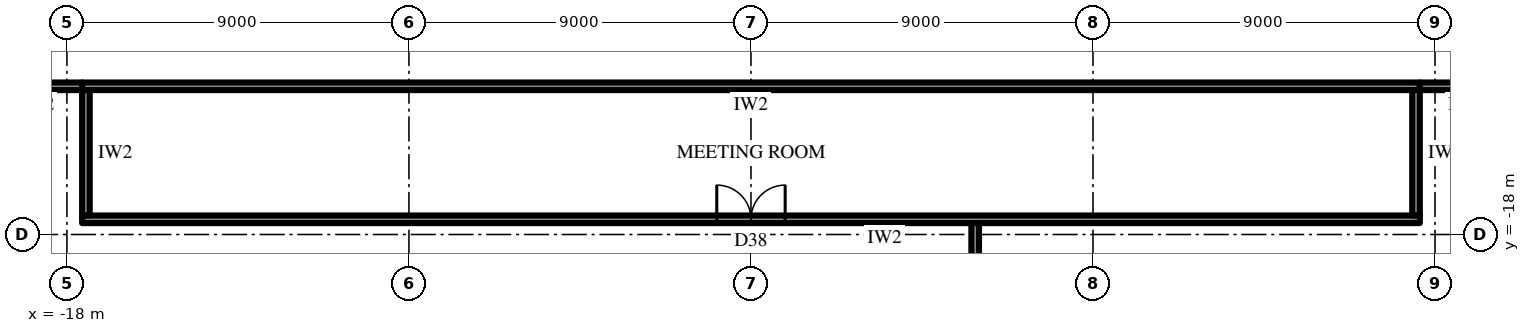
"""IFC4 building model, lengths in metres.
Left out: names, types, materials, properties, quantities, classifications, styles, units other than length and angle.
Written with IfcOpenShell. Run it as: python <this file> out.ifc"""

import sys

from ifc_helpers import new_model, si_unit, direction, frame, frame_2d, origin, place, context, subcontext, project, spatial, rectangle, extrude, element, fill, save


model = new_model("IFC4")
c1 = context("Model", 3, precision=1e-05, world=origin(), true_north=direction((0.0, 1.0)))
c2 = subcontext(c1, "Body", "Model", "MODEL_VIEW")
j1 = project(units=[si_unit("LENGTHUNIT", "METRE"), si_unit("PLANEANGLEUNIT", "RADIAN")], contexts=[c1])
p1 = place(None, origin())
s1 = spatial("IfcSite", under=j1, at=p1, CompositionType="ELEMENT")
p2 = place(p1, origin())
s2 = spatial("IfcBuilding", under=s1, at=p2, CompositionType="ELEMENT")
p3 = place(p2, frame((0.0, 0.0, 61.3)))
s3 = spatial("IfcBuildingStorey", under=s2, at=p3, CompositionType="ELEMENT", Elevation=61.3)
p4 = place(p3, frame((17.6, -14.1, 0.0), z_axis=(0.0, 0.0, 1.0), x_axis=(-1.0, 0.0, 0.0)))
e1 = element("IfcWall", 1, at=p4, inside=s3, PredefinedType="PARTITIONING", context=c2, shape_type="SweptSolid", body=[
    extrude(rectangle(XDim=35.2, YDim=0.2, at=frame_2d((17.6, 0.0))), origin(), (0.0, 0.0, 1.0), 4.0),
])
p5 = place(p3, frame((17.6, -17.6, 0.0), z_axis=(0.0, 0.0, 1.0), x_axis=(-1.0, 0.0, 0.0)))
e2 = element("IfcWall", 2, at=p5, inside=s3, PredefinedType="PARTITIONING", context=c2, shape_type="SweptSolid", body=[
    extrude(rectangle(XDim=35.2, YDim=0.2, at=frame_2d((17.6, 0.0))), origin(), (0.0, 0.0, 1.0), 4.0),
])
p6 = place(p5, frame((16.7, 0.0, 0.0)))
e3 = element("IfcOpeningElement", 3, at=p6, cuts=e2, PredefinedType="OPENING", context=c2, shape_type="SweptSolid", body=[
    extrude(rectangle(XDim=1.8, YDim=2.4, at=frame_2d((0.9, 1.2))), frame((0.0, 0.11, 0.0), z_axis=(0.0, -1.0, 0.0), x_axis=(1.0, 0.0, 0.0)), (0.0, 0.0, 1.0), 0.22),
])
for number, where, z_axis, x_axis in (
    (4, (17.5, -14.2, 0.0), (0.0, 0.0, 1.0), (0.0, -1.0, 0.0)),
    (5, (-17.5, -14.2, 0.0), (0.0, 0.0, 1.0), (0.0, -1.0, 0.0)),
):
    element("IfcWall", number, at=place(p3, frame(where, z_axis=z_axis, x_axis=x_axis)), inside=s3, PredefinedType="PARTITIONING", context=c2, shape_type="SweptSolid", body=[
        extrude(rectangle(XDim=3.3, YDim=0.2, at=frame_2d((1.65, 0.0))), origin(), (0.0, 0.0, 1.0), 4.0),
    ])
p7 = place(p3, frame((17.511, -22.67, 0.0), z_axis=(0.0, 0.0, 1.0), x_axis=(0.500000289772, 0.866025236485, 0.0)))
e6 = element("IfcWall", 6, at=p7, inside=s3, PredefinedType="PARTITIONING", context=c2, shape_type="SweptSolid", body=[
    extrude(rectangle(XDim=21.754, YDim=0.2, at=frame_2d((10.877, 0.0))), origin(), (0.0, 0.0, 1.0), 4.0),
])
p8 = place(p7, frame((4.589, 0.0, 0.0)))
e7 = element("IfcOpeningElement", 7, at=p8, cuts=e6, PredefinedType="OPENING", context=c2, shape_type="SweptSolid", body=[
    extrude(rectangle(XDim=1.8, YDim=2.4, at=frame_2d((0.9, 1.2))), frame((0.0, 0.11, 0.0), z_axis=(0.0, -1.0, 0.0), x_axis=(1.0, 0.0, 0.0)), (0.0, 0.0, 1.0), 0.22),
])
p9 = place(p7, frame((15.366, 0.0, 0.0)))
e8 = element("IfcOpeningElement", 8, at=p9, cuts=e6, PredefinedType="OPENING", context=c2, shape_type="SweptSolid", body=[
    extrude(rectangle(XDim=1.8, YDim=2.4, at=frame_2d((0.9, 1.2))), frame((0.0, 0.11, 0.0), z_axis=(0.0, -1.0, 0.0), x_axis=(1.0, 0.0, 0.0)), (0.0, 0.0, 1.0), 0.22),
])
for number, where, z_axis, x_axis in (
    (9, (-17.6, -14.1, 0.0), (0.0, 0.0, 1.0), (-1.0, 0.0, 0.0)),
    (10, (20.0, -14.1, 0.0), (0.0, 0.0, 1.0), (-1.0, 0.0, 0.0)),
):
    element("IfcWall", number, at=place(p3, frame(where, z_axis=z_axis, x_axis=x_axis)), inside=s3, PredefinedType="PARTITIONING", context=c2, shape_type="SweptSolid", body=[
        extrude(rectangle(XDim=2.4, YDim=0.2, at=frame_2d((1.2, 0.0))), origin(), (0.0, 0.0, 1.0), 4.0),
    ])
p10 = place(p3, frame((5.9, -17.7, 0.0), z_axis=(0.0, 0.0, 1.0), x_axis=(0.0, -1.0, 0.0)))
e11 = element("IfcWall", 11, at=p10, inside=s3, PredefinedType="PARTITIONING", context=c2, shape_type="SweptSolid", body=[
    extrude(rectangle(XDim=14.55, YDim=0.2, at=frame_2d((7.275, 0.0))), origin(), (0.0, 0.0, 1.0), 4.0),
])
p11 = place(p10, frame((0.955, 0.0, 0.0)))
e12 = element("IfcOpeningElement", 12, at=p11, cuts=e11, PredefinedType="OPENING", context=c2, shape_type="SweptSolid", body=[
    extrude(rectangle(XDim=1.0, YDim=2.2, at=frame_2d((0.5, 1.1))), frame((0.0, 0.11, 0.0), z_axis=(0.0, -1.0, 0.0), x_axis=(1.0, 0.0, 0.0)), (0.0, 0.0, 1.0), 0.22),
])
p12 = place(p6, frame((1.8, 0.0, 0.0), z_axis=(0.0, 0.0, 1.0), x_axis=(-1.0, 0.0, 0.0)))
e13 = element("IfcDoor", 13, at=p12, inside=s3, OperationType="DOUBLE_DOOR_SINGLE_SWING", PredefinedType="DOOR", context=c2, shape_type="SweptSolid", body=[
    extrude(rectangle(XDim=1.8, YDim=2.4, at=frame_2d((0.9, 1.2))), frame((0.0, 0.025, 0.0), z_axis=(0.0, -1.0, 0.0), x_axis=(1.0, 0.0, 0.0)), (0.0, 0.0, 1.0), 0.05),
])
fill(e3, e13)
save(model, sys.argv[1])
